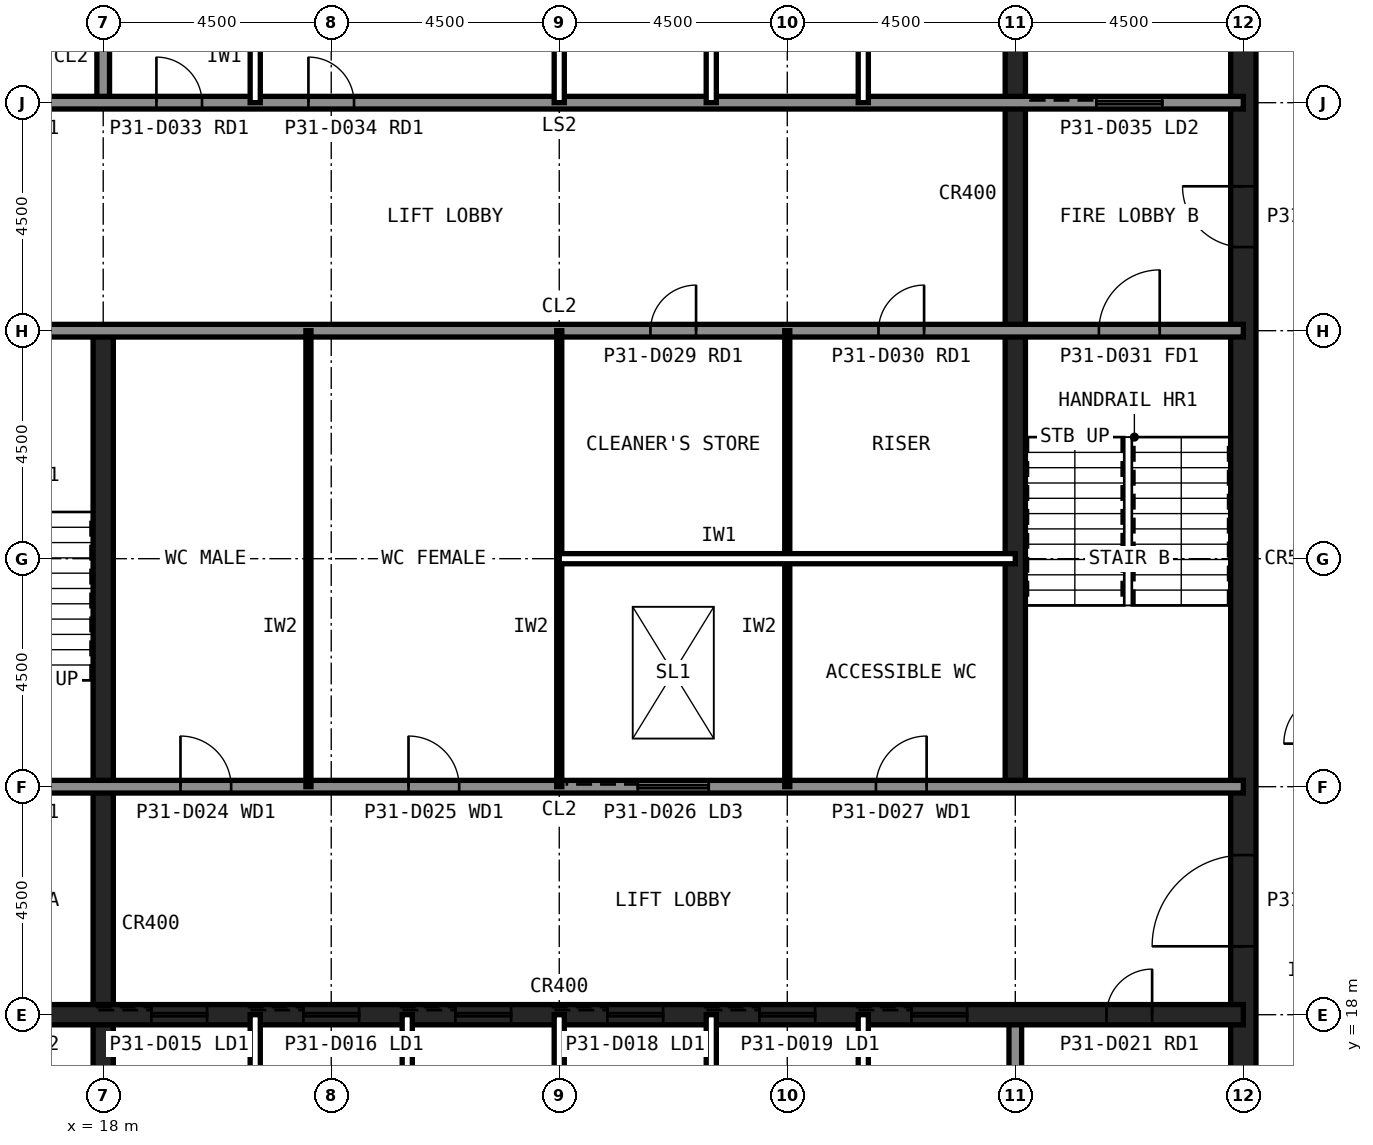
"""IFC4 building model, lengths in metres.
Left out: names, types, materials, properties, quantities, classifications, styles, units other than length and angle.
Written with IfcOpenShell. Run it as: python <this file> out.ifc"""

import sys

from ifc_helpers import new_model, si_unit, direction, frame, frame_2d, origin, place, context, subcontext, project, spatial, rectangle, extrude, element, fill, save


model = new_model("IFC4")
c1 = context("Model", 3, precision=1e-05, world=origin(), true_north=direction((0.0, 1.0)))
c2 = subcontext(c1, "Body", "Model", "MODEL_VIEW")
j1 = project(units=[si_unit("LENGTHUNIT", "METRE"), si_unit("PLANEANGLEUNIT", "RADIAN")], contexts=[c1])
p1 = place(None, origin())
s1 = spatial("IfcSite", under=j1, at=p1, CompositionType="ELEMENT")
p2 = place(p1, origin())
s2 = spatial("IfcBuilding", under=s1, at=p2, CompositionType="ELEMENT")
p3 = place(p2, frame((0.0, 0.0, 135.6)))
s3 = spatial("IfcBuildingStorey", under=s2, at=p3, CompositionType="ELEMENT", Elevation=135.6)
p4 = place(p3, frame((40.5, 13.5, 0.0), z_axis=(0.0, 0.0, 1.0), x_axis=(0.0, 1.0, 0.0)))
e1 = element("IfcWall", 1, at=p4, inside=s3, PredefinedType="SHEAR", context=c2, shape_type="SweptSolid", body=[
    extrude(rectangle(XDim=27.0, YDim=0.5, at=frame_2d((13.5, 0.0))), origin(), (0.0, 0.0, 1.0), 4.0),
])
p5 = place(p4, frame((5.85, 0.0, 0.0)))
e2 = element("IfcOpeningElement", 2, at=p5, cuts=e1, PredefinedType="OPENING", context=c2, shape_type="SweptSolid", body=[
    extrude(rectangle(XDim=1.8, YDim=2.1, at=frame_2d((0.9, 1.05))), frame((0.0, 0.26, 0.0), z_axis=(0.0, -1.0, 0.0), x_axis=(1.0, 0.0, 0.0)), (0.0, 0.0, 1.0), 0.52),
])
p6 = place(p4, frame((19.65, 0.0, 0.0)))
e3 = element("IfcOpeningElement", 3, at=p6, cuts=e1, PredefinedType="OPENING", context=c2, shape_type="SweptSolid", body=[
    extrude(rectangle(XDim=1.2, YDim=2.1, at=frame_2d((0.6, 1.05))), frame((0.0, 0.26, 0.0), z_axis=(0.0, -1.0, 0.0), x_axis=(1.0, 0.0, 0.0)), (0.0, 0.0, 1.0), 0.52),
])
p7 = place(p3, frame((18.0, 13.5, 0.0), z_axis=(0.0, 0.0, 1.0), x_axis=(0.0, 1.0, 0.0)))
e4 = element("IfcWall", 4, at=p7, inside=s3, PredefinedType="SHEAR", context=c2, shape_type="SweptSolid", body=[
    extrude(rectangle(XDim=18.0, YDim=0.4, at=frame_2d((9.0, 0.0))), origin(), (0.0, 0.0, 1.0), 4.0),
])
for number, where, z_axis, x_axis in (
    (5, (18.0, 36.0, 0.0), (0.0, 0.0, 1.0), (0.0, 1.0, 0.0)),
    (6, (36.0, 13.5, 0.0), (0.0, 0.0, 1.0), (0.0, 1.0, 0.0)),
):
    element("IfcWall", number, at=place(p3, frame(where, z_axis=z_axis, x_axis=x_axis)), inside=s3, PredefinedType="SOLIDWALL", context=c2, shape_type="SweptSolid", body=[
        extrude(rectangle(XDim=4.5, YDim=0.25, at=frame_2d((2.25, 0.0))), origin(), (0.0, 0.0, 1.0), 3.84),
    ])
p8 = place(p3, frame((36.0, 22.5, 0.0), z_axis=(0.0, 0.0, 1.0), x_axis=(0.0, 1.0, 0.0)))
e7 = element("IfcWall", 7, at=p8, inside=s3, PredefinedType="SHEAR", context=c2, shape_type="SweptSolid", body=[
    extrude(rectangle(XDim=18.0, YDim=0.4, at=frame_2d((9.0, 0.0))), origin(), (0.0, 0.0, 1.0), 4.0),
])
p9 = place(p3, frame((13.5, 18.0, 0.0), z_axis=(0.0, 0.0, 1.0), x_axis=(1.0, 0.0, 0.0)))
e8 = element("IfcWall", 8, at=p9, inside=s3, PredefinedType="SHEAR", context=c2, shape_type="SweptSolid", body=[
    extrude(rectangle(XDim=27.0, YDim=0.4, at=frame_2d((13.5, 0.0))), origin(), (0.0, 0.0, 1.0), 4.0),
])
p10 = place(p9, frame((24.3, 0.0, 0.0)))
e9 = element("IfcOpeningElement", 9, at=p10, cuts=e8, PredefinedType="OPENING", context=c2, shape_type="SweptSolid", body=[
    extrude(rectangle(XDim=0.9, YDim=2.1, at=frame_2d((0.45, 1.05))), frame((0.0, 0.21, 0.0), z_axis=(0.0, -1.0, 0.0), x_axis=(1.0, 0.0, 0.0)), (0.0, 0.0, 1.0), 0.42),
])
p11 = place(p9, frame((5.45, 0.0, 0.0)))
e10 = element("IfcOpeningElement", 10, at=p11, cuts=e8, PredefinedType="OPENING", context=c2, shape_type="SweptSolid", body=[
    extrude(rectangle(XDim=1.1, YDim=2.1, at=frame_2d((0.55, 1.05))), frame((0.0, 0.21, 0.0), z_axis=(0.0, -1.0, 0.0), x_axis=(1.0, 0.0, 0.0)), (0.0, 0.0, 1.0), 0.42),
])
p12 = place(p9, frame((8.45, 0.0, 0.0)))
e11 = element("IfcOpeningElement", 11, at=p12, cuts=e8, PredefinedType="OPENING", context=c2, shape_type="SweptSolid", body=[
    extrude(rectangle(XDim=1.1, YDim=2.1, at=frame_2d((0.55, 1.05))), frame((0.0, 0.21, 0.0), z_axis=(0.0, -1.0, 0.0), x_axis=(1.0, 0.0, 0.0)), (0.0, 0.0, 1.0), 0.42),
])
p13 = place(p9, frame((11.45, 0.0, 0.0)))
e12 = element("IfcOpeningElement", 12, at=p13, cuts=e8, PredefinedType="OPENING", context=c2, shape_type="SweptSolid", body=[
    extrude(rectangle(XDim=1.1, YDim=2.1, at=frame_2d((0.55, 1.05))), frame((0.0, 0.21, 0.0), z_axis=(0.0, -1.0, 0.0), x_axis=(1.0, 0.0, 0.0)), (0.0, 0.0, 1.0), 0.42),
])
p14 = place(p9, frame((14.45, 0.0, 0.0)))
e13 = element("IfcOpeningElement", 13, at=p14, cuts=e8, PredefinedType="OPENING", context=c2, shape_type="SweptSolid", body=[
    extrude(rectangle(XDim=1.1, YDim=2.1, at=frame_2d((0.55, 1.05))), frame((0.0, 0.21, 0.0), z_axis=(0.0, -1.0, 0.0), x_axis=(1.0, 0.0, 0.0)), (0.0, 0.0, 1.0), 0.42),
])
p15 = place(p9, frame((17.45, 0.0, 0.0)))
e14 = element("IfcOpeningElement", 14, at=p15, cuts=e8, PredefinedType="OPENING", context=c2, shape_type="SweptSolid", body=[
    extrude(rectangle(XDim=1.1, YDim=2.1, at=frame_2d((0.55, 1.05))), frame((0.0, 0.21, 0.0), z_axis=(0.0, -1.0, 0.0), x_axis=(1.0, 0.0, 0.0)), (0.0, 0.0, 1.0), 0.42),
])
p16 = place(p9, frame((20.45, 0.0, 0.0)))
e15 = element("IfcOpeningElement", 15, at=p16, cuts=e8, PredefinedType="OPENING", context=c2, shape_type="SweptSolid", body=[
    extrude(rectangle(XDim=1.1, YDim=2.1, at=frame_2d((0.55, 1.05))), frame((0.0, 0.21, 0.0), z_axis=(0.0, -1.0, 0.0), x_axis=(1.0, 0.0, 0.0)), (0.0, 0.0, 1.0), 0.42),
])
p17 = place(p9, frame((1.6, 0.0, 0.0)))
e16 = element("IfcOpeningElement", 16, at=p17, cuts=e8, PredefinedType="OPENING", context=c2, shape_type="SweptSolid", body=[
    extrude(rectangle(XDim=1.3, YDim=2.2, at=frame_2d((0.65, 1.1))), frame((0.0, 0.21, 0.0), z_axis=(0.0, -1.0, 0.0), x_axis=(1.0, 0.0, 0.0)), (0.0, 0.0, 1.0), 0.42),
])
p18 = place(p3, frame((13.5, 36.0, 0.0), z_axis=(0.0, 0.0, 1.0), x_axis=(1.0, 0.0, 0.0)))
e17 = element("IfcWall", 17, at=p18, inside=s3, PredefinedType="SOLIDWALL", context=c2, shape_type="SweptSolid", body=[
    extrude(rectangle(XDim=27.0, YDim=0.25, at=frame_2d((13.5, 0.0))), origin(), (0.0, 0.0, 1.0), 3.84),
])
p19 = place(p18, frame((1.8, 0.0, 0.0)))
e18 = element("IfcOpeningElement", 18, at=p19, cuts=e17, PredefinedType="OPENING", context=c2, shape_type="SweptSolid", body=[
    extrude(rectangle(XDim=0.9, YDim=2.1, at=frame_2d((0.45, 1.05))), frame((0.0, 0.135, 0.0), z_axis=(0.0, -1.0, 0.0), x_axis=(1.0, 0.0, 0.0)), (0.0, 0.0, 1.0), 0.27),
])
p20 = place(p18, frame((5.55, 0.0, 0.0)))
e19 = element("IfcOpeningElement", 19, at=p20, cuts=e17, PredefinedType="OPENING", context=c2, shape_type="SweptSolid", body=[
    extrude(rectangle(XDim=0.9, YDim=2.1, at=frame_2d((0.45, 1.05))), frame((0.0, 0.135, 0.0), z_axis=(0.0, -1.0, 0.0), x_axis=(1.0, 0.0, 0.0)), (0.0, 0.0, 1.0), 0.27),
])
p21 = place(p18, frame((8.55, 0.0, 0.0)))
e20 = element("IfcOpeningElement", 20, at=p21, cuts=e17, PredefinedType="OPENING", context=c2, shape_type="SweptSolid", body=[
    extrude(rectangle(XDim=0.9, YDim=2.1, at=frame_2d((0.45, 1.05))), frame((0.0, 0.135, 0.0), z_axis=(0.0, -1.0, 0.0), x_axis=(1.0, 0.0, 0.0)), (0.0, 0.0, 1.0), 0.27),
])
p22 = place(p18, frame((24.1, 0.0, 0.0)))
e21 = element("IfcOpeningElement", 21, at=p22, cuts=e17, PredefinedType="OPENING", context=c2, shape_type="SweptSolid", body=[
    extrude(rectangle(XDim=1.3, YDim=2.2, at=frame_2d((0.65, 1.1))), frame((0.0, 0.135, 0.0), z_axis=(0.0, -1.0, 0.0), x_axis=(1.0, 0.0, 0.0)), (0.0, 0.0, 1.0), 0.27),
])
p23 = place(p3, frame((13.5, 22.5, 0.0), z_axis=(0.0, 0.0, 1.0), x_axis=(1.0, 0.0, 0.0)))
e22 = element("IfcWall", 22, at=p23, inside=s3, PredefinedType="SOLIDWALL", context=c2, shape_type="SweptSolid", body=[
    extrude(rectangle(XDim=27.0, YDim=0.25, at=frame_2d((13.5, 0.0))), origin(), (0.0, 0.0, 1.0), 3.84),
])
p24 = place(p23, frame((1.65, 0.0, 0.0)))
e23 = element("IfcOpeningElement", 23, at=p24, cuts=e22, PredefinedType="OPENING", context=c2, shape_type="SweptSolid", body=[
    extrude(rectangle(XDim=1.2, YDim=2.1, at=frame_2d((0.6, 1.05))), frame((0.0, 0.135, 0.0), z_axis=(0.0, -1.0, 0.0), x_axis=(1.0, 0.0, 0.0)), (0.0, 0.0, 1.0), 0.27),
])
p25 = place(p23, frame((6.025, 0.0, 0.0)))
e24 = element("IfcOpeningElement", 24, at=p25, cuts=e22, PredefinedType="OPENING", context=c2, shape_type="SweptSolid", body=[
    extrude(rectangle(XDim=1.0, YDim=2.1, at=frame_2d((0.5, 1.05))), frame((0.0, 0.135, 0.0), z_axis=(0.0, -1.0, 0.0), x_axis=(1.0, 0.0, 0.0)), (0.0, 0.0, 1.0), 0.27),
])
p26 = place(p23, frame((10.525, 0.0, 0.0)))
e25 = element("IfcOpeningElement", 25, at=p26, cuts=e22, PredefinedType="OPENING", context=c2, shape_type="SweptSolid", body=[
    extrude(rectangle(XDim=1.0, YDim=2.1, at=frame_2d((0.5, 1.05))), frame((0.0, 0.135, 0.0), z_axis=(0.0, -1.0, 0.0), x_axis=(1.0, 0.0, 0.0)), (0.0, 0.0, 1.0), 0.27),
])
p27 = place(p23, frame((19.75, 0.0, 0.0)))
e26 = element("IfcOpeningElement", 26, at=p27, cuts=e22, PredefinedType="OPENING", context=c2, shape_type="SweptSolid", body=[
    extrude(rectangle(XDim=1.0, YDim=2.1, at=frame_2d((0.5, 1.05))), frame((0.0, 0.135, 0.0), z_axis=(0.0, -1.0, 0.0), x_axis=(1.0, 0.0, 0.0)), (0.0, 0.0, 1.0), 0.27),
])
p28 = place(p23, frame((15.05, 0.0, 0.0)))
e27 = element("IfcOpeningElement", 27, at=p28, cuts=e22, PredefinedType="OPENING", context=c2, shape_type="SweptSolid", body=[
    extrude(rectangle(XDim=1.4, YDim=2.4, at=frame_2d((0.7, 1.2))), frame((0.0, 0.135, 0.0), z_axis=(0.0, -1.0, 0.0), x_axis=(1.0, 0.0, 0.0)), (0.0, 0.0, 1.0), 0.27),
])
p29 = place(p3, frame((13.5, 31.5, 0.0), z_axis=(0.0, 0.0, 1.0), x_axis=(1.0, 0.0, 0.0)))
e28 = element("IfcWall", 28, at=p29, inside=s3, PredefinedType="SOLIDWALL", context=c2, shape_type="SweptSolid", body=[
    extrude(rectangle(XDim=27.0, YDim=0.25, at=frame_2d((13.5, 0.0))), origin(), (0.0, 0.0, 1.0), 3.84),
])
p30 = place(p29, frame((24.15, 0.0, 0.0)))
e29 = element("IfcOpeningElement", 29, at=p30, cuts=e28, PredefinedType="OPENING", context=c2, shape_type="SweptSolid", body=[
    extrude(rectangle(XDim=1.2, YDim=2.1, at=frame_2d((0.6, 1.05))), frame((0.0, 0.135, 0.0), z_axis=(0.0, -1.0, 0.0), x_axis=(1.0, 0.0, 0.0)), (0.0, 0.0, 1.0), 0.27),
])
p31 = place(p29, frame((15.3, 0.0, 0.0)))
e30 = element("IfcOpeningElement", 30, at=p31, cuts=e28, PredefinedType="OPENING", context=c2, shape_type="SweptSolid", body=[
    extrude(rectangle(XDim=0.9, YDim=2.1, at=frame_2d((0.45, 1.05))), frame((0.0, 0.135, 0.0), z_axis=(0.0, -1.0, 0.0), x_axis=(1.0, 0.0, 0.0)), (0.0, 0.0, 1.0), 0.27),
])
p32 = place(p29, frame((19.8, 0.0, 0.0)))
e31 = element("IfcOpeningElement", 31, at=p32, cuts=e28, PredefinedType="OPENING", context=c2, shape_type="SweptSolid", body=[
    extrude(rectangle(XDim=0.9, YDim=2.1, at=frame_2d((0.45, 1.05))), frame((0.0, 0.135, 0.0), z_axis=(0.0, -1.0, 0.0), x_axis=(1.0, 0.0, 0.0)), (0.0, 0.0, 1.0), 0.27),
])
for number, where, z_axis, x_axis in (
    (32, (21.0, 13.5, 0.0), (0.0, 0.0, 1.0), (0.0, 1.0, 0.0)),
    (33, (21.0, 36.0, 0.0), (0.0, 0.0, 1.0), (0.0, 1.0, 0.0)),
    (34, (24.0, 13.5, 0.0), (0.0, 0.0, 1.0), (0.0, 1.0, 0.0)),
    (35, (27.0, 13.5, 0.0), (0.0, 0.0, 1.0), (0.0, 1.0, 0.0)),
    (36, (27.0, 36.0, 0.0), (0.0, 0.0, 1.0), (0.0, 1.0, 0.0)),
    (37, (30.0, 13.5, 0.0), (0.0, 0.0, 1.0), (0.0, 1.0, 0.0)),
    (38, (30.0, 36.0, 0.0), (0.0, 0.0, 1.0), (0.0, 1.0, 0.0)),
    (39, (33.0, 13.5, 0.0), (0.0, 0.0, 1.0), (0.0, 1.0, 0.0)),
    (40, (33.0, 36.0, 0.0), (0.0, 0.0, 1.0), (0.0, 1.0, 0.0)),
):
    element("IfcWall", number, at=place(p3, frame(where, z_axis=z_axis, x_axis=x_axis)), inside=s3, PredefinedType="PARTITIONING", context=c2, shape_type="SweptSolid", body=[
        extrude(rectangle(XDim=4.5, YDim=0.2, at=frame_2d((2.25, 0.0))), origin(), (0.0, 0.0, 1.0), 3.84),
    ])
for number, where, z_axis, x_axis in (
    (41, (22.05, 22.5, 0.0), (0.0, 0.0, 1.0), (0.0, 1.0, 0.0)),
    (42, (27.0, 22.5, 0.0), (0.0, 0.0, 1.0), (0.0, 1.0, 0.0)),
    (43, (31.5, 22.5, 0.0), (0.0, 0.0, 1.0), (0.0, 1.0, 0.0)),
):
    element("IfcWall", number, at=place(p3, frame(where, z_axis=z_axis, x_axis=x_axis)), inside=s3, PredefinedType="PLUMBINGWALL", context=c2, shape_type="SweptSolid", body=[
        extrude(rectangle(XDim=9.0, YDim=0.1, at=frame_2d((4.5, 0.0))), origin(), (0.0, 0.0, 1.0), 3.84),
    ])
p33 = place(p3, frame((27.0, 27.0, 0.0), z_axis=(0.0, 0.0, 1.0), x_axis=(1.0, 0.0, 0.0)))
e44 = element("IfcWall", 44, at=p33, inside=s3, PredefinedType="PARTITIONING", context=c2, shape_type="SweptSolid", body=[
    extrude(rectangle(XDim=9.0, YDim=0.2, at=frame_2d((4.5, 0.0))), origin(), (0.0, 0.0, 1.0), 3.84),
])
p34 = place(p5, origin())
e45 = element("IfcDoor", 45, at=p34, inside=s3, OperationType="SINGLE_SWING_LEFT", PredefinedType="DOOR", context=c2, shape_type="SweptSolid", body=[
    extrude(rectangle(XDim=1.8, YDim=2.1, at=frame_2d((0.9, 1.05))), frame((0.0, 0.025, 0.0), z_axis=(0.0, -1.0, 0.0), x_axis=(1.0, 0.0, 0.0)), (0.0, 0.0, 1.0), 0.05),
])
fill(e2, e45)
p35 = place(p6, origin())
e46 = element("IfcDoor", 46, at=p35, inside=s3, OperationType="SINGLE_SWING_RIGHT", PredefinedType="DOOR", context=c2, shape_type="SweptSolid", body=[
    extrude(rectangle(XDim=1.2, YDim=2.1, at=frame_2d((0.6, 1.05))), frame((0.0, 0.025, 0.0), z_axis=(0.0, -1.0, 0.0), x_axis=(1.0, 0.0, 0.0)), (0.0, 0.0, 1.0), 0.05),
])
fill(e3, e46)
p36 = place(p30, origin())
e47 = element("IfcDoor", 47, at=p36, inside=s3, OperationType="SINGLE_SWING_RIGHT", PredefinedType="DOOR", context=c2, shape_type="SweptSolid", body=[
    extrude(rectangle(XDim=1.2, YDim=2.1, at=frame_2d((0.6, 1.05))), frame((0.0, 0.025, 0.0), z_axis=(0.0, -1.0, 0.0), x_axis=(1.0, 0.0, 0.0)), (0.0, 0.0, 1.0), 0.05),
])
fill(e29, e47)
p37 = place(p25, origin())
e48 = element("IfcDoor", 48, at=p37, inside=s3, OperationType="SINGLE_SWING_LEFT", PredefinedType="DOOR", context=c2, shape_type="SweptSolid", body=[
    extrude(rectangle(XDim=1.0, YDim=2.1, at=frame_2d((0.5, 1.05))), frame((0.0, 0.025, 0.0), z_axis=(0.0, -1.0, 0.0), x_axis=(1.0, 0.0, 0.0)), (0.0, 0.0, 1.0), 0.05),
])
fill(e24, e48)
p38 = place(p26, origin())
e49 = element("IfcDoor", 49, at=p38, inside=s3, OperationType="SINGLE_SWING_LEFT", PredefinedType="DOOR", context=c2, shape_type="SweptSolid", body=[
    extrude(rectangle(XDim=1.0, YDim=2.1, at=frame_2d((0.5, 1.05))), frame((0.0, 0.025, 0.0), z_axis=(0.0, -1.0, 0.0), x_axis=(1.0, 0.0, 0.0)), (0.0, 0.0, 1.0), 0.05),
])
fill(e25, e49)
p39 = place(p27, origin())
e50 = element("IfcDoor", 50, at=p39, inside=s3, OperationType="SINGLE_SWING_RIGHT", PredefinedType="DOOR", context=c2, shape_type="SweptSolid", body=[
    extrude(rectangle(XDim=1.0, YDim=2.1, at=frame_2d((0.5, 1.05))), frame((0.0, 0.025, 0.0), z_axis=(0.0, -1.0, 0.0), x_axis=(1.0, 0.0, 0.0)), (0.0, 0.0, 1.0), 0.05),
])
fill(e26, e50)
p40 = place(p31, origin())
e51 = element("IfcDoor", 51, at=p40, inside=s3, OperationType="SINGLE_SWING_RIGHT", PredefinedType="DOOR", context=c2, shape_type="SweptSolid", body=[
    extrude(rectangle(XDim=0.9, YDim=2.1, at=frame_2d((0.45, 1.05))), frame((0.0, 0.025, 0.0), z_axis=(0.0, -1.0, 0.0), x_axis=(1.0, 0.0, 0.0)), (0.0, 0.0, 1.0), 0.05),
])
fill(e30, e51)
p41 = place(p32, origin())
e52 = element("IfcDoor", 52, at=p41, inside=s3, OperationType="SINGLE_SWING_RIGHT", PredefinedType="DOOR", context=c2, shape_type="SweptSolid", body=[
    extrude(rectangle(XDim=0.9, YDim=2.1, at=frame_2d((0.45, 1.05))), frame((0.0, 0.025, 0.0), z_axis=(0.0, -1.0, 0.0), x_axis=(1.0, 0.0, 0.0)), (0.0, 0.0, 1.0), 0.05),
])
fill(e31, e52)
p42 = place(p10, origin())
e53 = element("IfcDoor", 53, at=p42, inside=s3, OperationType="SINGLE_SWING_RIGHT", PredefinedType="DOOR", context=c2, shape_type="SweptSolid", body=[
    extrude(rectangle(XDim=0.9, YDim=2.1, at=frame_2d((0.45, 1.05))), frame((0.0, 0.025, 0.0), z_axis=(0.0, -1.0, 0.0), x_axis=(1.0, 0.0, 0.0)), (0.0, 0.0, 1.0), 0.05),
])
fill(e9, e53)
p43 = place(p20, origin())
e54 = element("IfcDoor", 54, at=p43, inside=s3, OperationType="SINGLE_SWING_LEFT", PredefinedType="DOOR", context=c2, shape_type="SweptSolid", body=[
    extrude(rectangle(XDim=0.9, YDim=2.1, at=frame_2d((0.45, 1.05))), frame((0.0, 0.025, 0.0), z_axis=(0.0, -1.0, 0.0), x_axis=(1.0, 0.0, 0.0)), (0.0, 0.0, 1.0), 0.05),
])
fill(e19, e54)
p44 = place(p21, origin())
e55 = element("IfcDoor", 55, at=p44, inside=s3, OperationType="SINGLE_SWING_LEFT", PredefinedType="DOOR", context=c2, shape_type="SweptSolid", body=[
    extrude(rectangle(XDim=0.9, YDim=2.1, at=frame_2d((0.45, 1.05))), frame((0.0, 0.025, 0.0), z_axis=(0.0, -1.0, 0.0), x_axis=(1.0, 0.0, 0.0)), (0.0, 0.0, 1.0), 0.05),
])
fill(e20, e55)
p45 = place(p11, origin())
e56 = element("IfcDoor", 56, at=p45, inside=s3, OperationType="SLIDING_TO_LEFT", PredefinedType="DOOR", context=c2, shape_type="SweptSolid", body=[
    extrude(rectangle(XDim=1.1, YDim=2.1, at=frame_2d((0.55, 1.05))), frame((0.0, 0.025, 0.0), z_axis=(0.0, -1.0, 0.0), x_axis=(1.0, 0.0, 0.0)), (0.0, 0.0, 1.0), 0.05),
])
fill(e10, e56)
p46 = place(p12, origin())
e57 = element("IfcDoor", 57, at=p46, inside=s3, OperationType="SLIDING_TO_LEFT", PredefinedType="DOOR", context=c2, shape_type="SweptSolid", body=[
    extrude(rectangle(XDim=1.1, YDim=2.1, at=frame_2d((0.55, 1.05))), frame((0.0, 0.025, 0.0), z_axis=(0.0, -1.0, 0.0), x_axis=(1.0, 0.0, 0.0)), (0.0, 0.0, 1.0), 0.05),
])
fill(e11, e57)
p47 = place(p13, origin())
e58 = element("IfcDoor", 58, at=p47, inside=s3, OperationType="SLIDING_TO_LEFT", PredefinedType="DOOR", context=c2, shape_type="SweptSolid", body=[
    extrude(rectangle(XDim=1.1, YDim=2.1, at=frame_2d((0.55, 1.05))), frame((0.0, 0.025, 0.0), z_axis=(0.0, -1.0, 0.0), x_axis=(1.0, 0.0, 0.0)), (0.0, 0.0, 1.0), 0.05),
])
fill(e12, e58)
p48 = place(p14, origin())
e59 = element("IfcDoor", 59, at=p48, inside=s3, OperationType="SLIDING_TO_LEFT", PredefinedType="DOOR", context=c2, shape_type="SweptSolid", body=[
    extrude(rectangle(XDim=1.1, YDim=2.1, at=frame_2d((0.55, 1.05))), frame((0.0, 0.025, 0.0), z_axis=(0.0, -1.0, 0.0), x_axis=(1.0, 0.0, 0.0)), (0.0, 0.0, 1.0), 0.05),
])
fill(e13, e59)
p49 = place(p15, origin())
e60 = element("IfcDoor", 60, at=p49, inside=s3, OperationType="SLIDING_TO_LEFT", PredefinedType="DOOR", context=c2, shape_type="SweptSolid", body=[
    extrude(rectangle(XDim=1.1, YDim=2.1, at=frame_2d((0.55, 1.05))), frame((0.0, 0.025, 0.0), z_axis=(0.0, -1.0, 0.0), x_axis=(1.0, 0.0, 0.0)), (0.0, 0.0, 1.0), 0.05),
])
fill(e14, e60)
p50 = place(p16, origin())
e61 = element("IfcDoor", 61, at=p50, inside=s3, OperationType="SLIDING_TO_LEFT", PredefinedType="DOOR", context=c2, shape_type="SweptSolid", body=[
    extrude(rectangle(XDim=1.1, YDim=2.1, at=frame_2d((0.55, 1.05))), frame((0.0, 0.025, 0.0), z_axis=(0.0, -1.0, 0.0), x_axis=(1.0, 0.0, 0.0)), (0.0, 0.0, 1.0), 0.05),
])
fill(e15, e61)
p51 = place(p22, origin())
e62 = element("IfcDoor", 62, at=p51, inside=s3, OperationType="SLIDING_TO_LEFT", PredefinedType="DOOR", context=c2, shape_type="SweptSolid", body=[
    extrude(rectangle(XDim=1.3, YDim=2.2, at=frame_2d((0.65, 1.1))), frame((0.0, 0.025, 0.0), z_axis=(0.0, -1.0, 0.0), x_axis=(1.0, 0.0, 0.0)), (0.0, 0.0, 1.0), 0.05),
])
fill(e21, e62)
p52 = place(p28, origin())
e63 = element("IfcDoor", 63, at=p52, inside=s3, OperationType="SLIDING_TO_LEFT", PredefinedType="DOOR", context=c2, shape_type="SweptSolid", body=[
    extrude(rectangle(XDim=1.4, YDim=2.4, at=frame_2d((0.7, 1.2))), frame((0.0, 0.025, 0.0), z_axis=(0.0, -1.0, 0.0), x_axis=(1.0, 0.0, 0.0)), (0.0, 0.0, 1.0), 0.05),
])
fill(e27, e63)
save(model, sys.argv[1])
